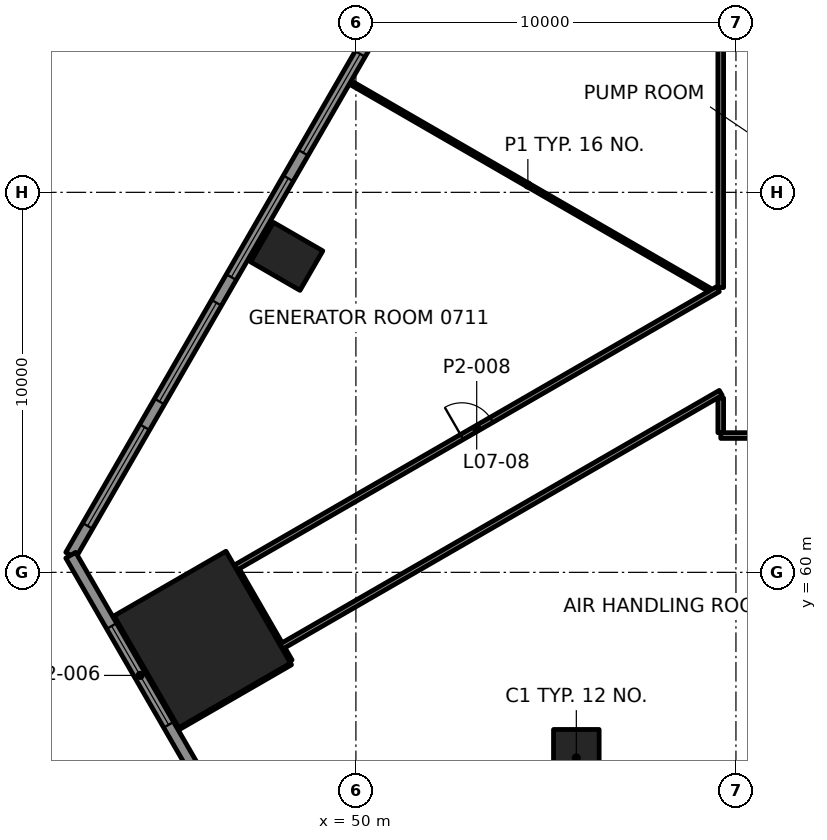
"""IFC4 building model, lengths in metres.
Left out: names, types, materials, properties, quantities, classifications, styles, units other than length and angle.
Written with IfcOpenShell. Run it as: python <this file> out.ifc"""

import sys

from ifc_helpers import new_model, si_unit, direction, frame, frame_2d, origin, origin_2d, place, context, subcontext, project, spatial, rectangle, extrude, element, fill, save


model = new_model("IFC4")
c1 = context("Model", 3, precision=1e-05, world=origin(), true_north=direction((0.0, 1.0)))
c2 = subcontext(c1, "Body", "Model", "MODEL_VIEW")
j1 = project(units=[si_unit("LENGTHUNIT", "METRE"), si_unit("PLANEANGLEUNIT", "RADIAN")], contexts=[c1])
p1 = place(None, origin())
s1 = spatial("IfcSite", under=j1, at=p1, CompositionType="ELEMENT")
p2 = place(p1, origin())
s2 = spatial("IfcBuilding", under=s1, at=p2, CompositionType="ELEMENT")
p3 = place(p2, frame((0.0, 0.0, 35.5)))
s3 = spatial("IfcBuildingStorey", under=s2, at=p3, CompositionType="ELEMENT", Elevation=35.5)
p4 = place(p3, frame((45.959, 58.233, 0.0), z_axis=(0.0, 0.0, 1.0), x_axis=(0.5, -0.866025403784, 0.0)))
e1 = element("IfcColumn", 1, at=p4, inside=s3, PredefinedType="COLUMN", context=c2, shape_type="SweptSolid", body=[
    extrude(rectangle(XDim=3.4, YDim=3.4, at=origin_2d()), origin(), (0.0, 0.0, 1.0), 4.5),
])
for number, where, z_axis, x_axis in (
    (2, (55.8, 55.115, -0.0), (0.0, 0.0, 1.0), (1.0, 0.0, 0.0)),
    (3, (48.179, 68.315, -0.0), (0.0, 0.0, 1.0), (-0.5, -0.866, 0.0)),
):
    element("IfcColumn", number, at=place(p3, frame(where, z_axis=z_axis, x_axis=x_axis)), inside=s3, PredefinedType="COLUMN", context=c2, shape_type="SweptSolid", body=[
        extrude(rectangle(XDim=1.2, YDim=1.5, at=origin_2d()), origin(), (0.0, 0.0, 1.0), 4.5),
    ])
p5 = place(p3, frame((90.4, 63.6, 0.0), z_axis=(0.0, 0.0, 1.0), x_axis=(-1.0, 0.0, 0.0)))
e4 = element("IfcWall", 4, at=p5, inside=s3, PredefinedType="PARTITIONING", context=c2, shape_type="SweptSolid", body=[
    extrude(rectangle(XDim=30.799, YDim=0.15, at=frame_2d((15.4, 0.0))), origin(), (0.0, 0.0, 1.0), 3.7),
])
p6 = place(p5, frame((3.751, 0.0, 0.0)))
e5 = element("IfcOpeningElement", 5, at=p6, cuts=e4, PredefinedType="OPENING", context=c2, shape_type="SweptSolid", body=[
    extrude(rectangle(XDim=0.9, YDim=2.1, at=frame_2d((0.45, 1.05))), frame((0.0, 0.085, 0.0), z_axis=(0.0, -1.0, 0.0), x_axis=(1.0, 0.0, 0.0)), (0.0, 0.0, 1.0), 0.17),
])
p7 = place(p5, frame((14.8, 0.0, 0.0)))
e6 = element("IfcOpeningElement", 6, at=p7, cuts=e4, PredefinedType="OPENING", context=c2, shape_type="SweptSolid", body=[
    extrude(rectangle(XDim=1.2, YDim=2.1, at=frame_2d((0.6, 1.05))), frame((0.0, 0.085, 0.0), z_axis=(0.0, -1.0, 0.0), x_axis=(1.0, 0.0, 0.0)), (0.0, 0.0, 1.0), 0.17),
])
p8 = place(p5, frame((25.998, 0.0, 0.0)))
e7 = element("IfcOpeningElement", 7, at=p8, cuts=e4, PredefinedType="OPENING", context=c2, shape_type="SweptSolid", body=[
    extrude(rectangle(XDim=1.2, YDim=2.1, at=frame_2d((0.6, 1.05))), frame((0.0, 0.085, 0.0), z_axis=(0.0, -1.0, 0.0), x_axis=(1.0, 0.0, 0.0)), (0.0, 0.0, 1.0), 0.17),
])
p9 = place(p3, frame((45.198, 55.831, 0.0), z_axis=(0.0, 0.0, 1.0), x_axis=(0.866014251095, 0.500019316528, 0.0)))
e8 = element("IfcWall", 8, at=p9, inside=s3, PredefinedType="PARTITIONING", context=c2, shape_type="SweptSolid", body=[
    extrude(rectangle(XDim=3.559, YDim=0.1, at=frame_2d((1.78, 0.0))), origin(), (0.0, 0.0, 1.0), 3.7),
])
p10 = place(p3, frame((48.031, 58.044, 0.0), z_axis=(0.0, 0.0, 1.0), x_axis=(0.866027935033, 0.499995615723, 0.0)))
e9 = element("IfcWall", 9, at=p10, inside=s3, PredefinedType="PARTITIONING", context=c2, shape_type="SweptSolid", body=[
    extrude(rectangle(XDim=13.358, YDim=0.15, at=frame_2d((6.679, 0.0))), origin(), (0.0, 0.0, 1.0), 3.547),
])
p11 = place(p3, frame((46.832, 60.123, 0.0), z_axis=(0.0, 0.0, 1.0), x_axis=(0.866022484069, 0.500005057062, 0.0)))
e10 = element("IfcWall", 10, at=p11, inside=s3, PredefinedType="PARTITIONING", context=c2, shape_type="SweptSolid", body=[
    extrude(rectangle(XDim=14.657, YDim=0.15, at=frame_2d((7.329, 0.0))), origin(), (0.0, 0.0, 1.0), 3.7),
])
p12 = place(p11, frame((6.879, 0.0, 0.0)))
e11 = element("IfcOpeningElement", 11, at=p12, cuts=e10, PredefinedType="OPENING", context=c2, shape_type="SweptSolid", body=[
    extrude(rectangle(XDim=0.9, YDim=2.1, at=frame_2d((0.45, 1.05))), frame((0.0, 0.085, 0.0), z_axis=(0.0, -1.0, 0.0), x_axis=(1.0, 0.0, 0.0)), (0.0, 0.0, 1.0), 0.17),
])
p13 = place(p3, frame((59.6, 63.676, 0.0), z_axis=(0.0, 0.0, 1.0), x_axis=(0.0, 1.0, 0.0)))
e12 = element("IfcWall", 12, at=p13, inside=s3, PredefinedType="PARTITIONING", context=c2, shape_type="SweptSolid", body=[
    extrude(rectangle(XDim=0.911, YDim=0.15, at=frame_2d((0.456, 0.0))), origin(), (0.0, 0.0, 1.0), 3.7),
])
p14 = place(p3, frame((59.6, 67.494, 0.0), z_axis=(0.0, 0.0, 1.0), x_axis=(0.0, 1.0, 0.0)))
e13 = element("IfcWall", 13, at=p14, inside=s3, PredefinedType="PARTITIONING", context=c2, shape_type="SweptSolid", body=[
    extrude(rectangle(XDim=18.905, YDim=0.15, at=frame_2d((9.453, 0.0))), origin(), (0.0, 0.0, 1.0), 3.7),
])
p15 = place(p3, frame((48.256, 57.655, 0.0), z_axis=(0.0, 0.0, 1.0), x_axis=(-0.499854089722, 0.866109628736, 0.0)))
e14 = element("IfcWall", 14, at=p15, inside=s3, PredefinedType="PARTITIONING", context=c2, shape_type="SweptSolid", body=[
    extrude(rectangle(XDim=0.375, YDim=0.15, at=frame_2d((0.187, 0.0))), origin(), (0.0, 0.0, 1.0), 3.7),
])
p16 = place(p3, frame((59.299, 67.437, 0.0), z_axis=(0.0, 0.0, 1.0), x_axis=(-0.866020403282, 0.500008661025, 0.0)))
e15 = element("IfcWall", 15, at=p16, inside=s3, PredefinedType="PARTITIONING", context=c2, shape_type="SweptSolid", body=[
    extrude(rectangle(XDim=11.027, YDim=0.1, at=frame_2d((5.513, 0.0))), origin(), (0.0, 0.0, 1.0), 3.465),
])
p17 = place(p3, frame((47.993, 58.109, 0.0), z_axis=(0.0, 0.0, 1.0), x_axis=(-0.499944821793, 0.866057258594, 0.0)))
e16 = element("IfcWall", 16, at=p17, inside=s3, PredefinedType="PARTITIONING", context=c2, shape_type="SweptSolid", body=[
    extrude(rectangle(XDim=2.249, YDim=0.15, at=frame_2d((1.125, 0.0))), origin(), (0.0, 0.0, 1.0), 3.547),
])
p18 = place(p3, frame((71.348, 110.424, 0.0), z_axis=(0.0, 0.0, 1.0), x_axis=(-0.500000550228, -0.86602508611, 0.0)))
e17 = element("IfcWall", 17, at=p18, inside=s3, PredefinedType="SOLIDWALL", context=c2, shape_type="SweptSolid", body=[
    extrude(rectangle(XDim=57.704, YDim=0.3, at=frame_2d((28.852, 0.0))), origin(), (0.0, 0.0, 1.0), 4.3),
])
p19 = place(p18, frame((0.89, 0.0, 0.8)))
e18 = element("IfcOpeningElement", 18, at=p19, cuts=e17, PredefinedType="OPENING", context=c2, shape_type="SweptSolid", body=[
    extrude(rectangle(XDim=3.0, YDim=2.4, at=frame_2d((1.5, 1.2))), frame((0.0, 0.16, 0.0), z_axis=(0.0, -1.0, 0.0), x_axis=(1.0, 0.0, 0.0)), (0.0, 0.0, 1.0), 0.32),
])
p20 = place(p18, frame((4.67, 0.0, 0.8)))
e19 = element("IfcOpeningElement", 19, at=p20, cuts=e17, PredefinedType="OPENING", context=c2, shape_type="SweptSolid", body=[
    extrude(rectangle(XDim=3.0, YDim=2.4, at=frame_2d((1.5, 1.2))), frame((0.0, 0.16, 0.0), z_axis=(0.0, -1.0, 0.0), x_axis=(1.0, 0.0, 0.0)), (0.0, 0.0, 1.0), 0.32),
])
p21 = place(p18, frame((8.451, 0.0, 0.8)))
e20 = element("IfcOpeningElement", 20, at=p21, cuts=e17, PredefinedType="OPENING", context=c2, shape_type="SweptSolid", body=[
    extrude(rectangle(XDim=3.0, YDim=2.4, at=frame_2d((1.5, 1.2))), frame((0.0, 0.16, 0.0), z_axis=(0.0, -1.0, 0.0), x_axis=(1.0, 0.0, 0.0)), (0.0, 0.0, 1.0), 0.32),
])
p22 = place(p18, frame((12.231, 0.0, 0.8)))
e21 = element("IfcOpeningElement", 21, at=p22, cuts=e17, PredefinedType="OPENING", context=c2, shape_type="SweptSolid", body=[
    extrude(rectangle(XDim=3.0, YDim=2.4, at=frame_2d((1.5, 1.2))), frame((0.0, 0.16, 0.0), z_axis=(0.0, -1.0, 0.0), x_axis=(1.0, 0.0, 0.0)), (0.0, 0.0, 1.0), 0.32),
])
p23 = place(p18, frame((16.011, 0.0, 0.8)))
e22 = element("IfcOpeningElement", 22, at=p23, cuts=e17, PredefinedType="OPENING", context=c2, shape_type="SweptSolid", body=[
    extrude(rectangle(XDim=3.0, YDim=2.4, at=frame_2d((1.5, 1.2))), frame((0.0, 0.16, 0.0), z_axis=(0.0, -1.0, 0.0), x_axis=(1.0, 0.0, 0.0)), (0.0, 0.0, 1.0), 0.32),
])
p24 = place(p18, frame((19.792, 0.0, 0.8)))
e23 = element("IfcOpeningElement", 23, at=p24, cuts=e17, PredefinedType="OPENING", context=c2, shape_type="SweptSolid", body=[
    extrude(rectangle(XDim=3.0, YDim=2.4, at=frame_2d((1.5, 1.2))), frame((0.0, 0.16, 0.0), z_axis=(0.0, -1.0, 0.0), x_axis=(1.0, 0.0, 0.0)), (0.0, 0.0, 1.0), 0.32),
])
p25 = place(p18, frame((23.572, 0.0, 0.8)))
e24 = element("IfcOpeningElement", 24, at=p25, cuts=e17, PredefinedType="OPENING", context=c2, shape_type="SweptSolid", body=[
    extrude(rectangle(XDim=3.0, YDim=2.4, at=frame_2d((1.5, 1.2))), frame((0.0, 0.16, 0.0), z_axis=(0.0, -1.0, 0.0), x_axis=(1.0, 0.0, 0.0)), (0.0, 0.0, 1.0), 0.32),
])
p26 = place(p18, frame((27.352, 0.0, 0.8)))
e25 = element("IfcOpeningElement", 25, at=p26, cuts=e17, PredefinedType="OPENING", context=c2, shape_type="SweptSolid", body=[
    extrude(rectangle(XDim=3.0, YDim=2.4, at=frame_2d((1.5, 1.2))), frame((0.0, 0.16, 0.0), z_axis=(0.0, -1.0, 0.0), x_axis=(1.0, 0.0, 0.0)), (0.0, 0.0, 1.0), 0.32),
])
p27 = place(p18, frame((31.132, 0.0, 0.8)))
e26 = element("IfcOpeningElement", 26, at=p27, cuts=e17, PredefinedType="OPENING", context=c2, shape_type="SweptSolid", body=[
    extrude(rectangle(XDim=3.0, YDim=2.4, at=frame_2d((1.5, 1.2))), frame((0.0, 0.16, 0.0), z_axis=(0.0, -1.0, 0.0), x_axis=(1.0, 0.0, 0.0)), (0.0, 0.0, 1.0), 0.32),
])
p28 = place(p18, frame((34.913, 0.0, 0.8)))
e27 = element("IfcOpeningElement", 27, at=p28, cuts=e17, PredefinedType="OPENING", context=c2, shape_type="SweptSolid", body=[
    extrude(rectangle(XDim=3.0, YDim=2.4, at=frame_2d((1.5, 1.2))), frame((0.0, 0.16, 0.0), z_axis=(0.0, -1.0, 0.0), x_axis=(1.0, 0.0, 0.0)), (0.0, 0.0, 1.0), 0.32),
])
p29 = place(p18, frame((38.693, 0.0, 0.8)))
e28 = element("IfcOpeningElement", 28, at=p29, cuts=e17, PredefinedType="OPENING", context=c2, shape_type="SweptSolid", body=[
    extrude(rectangle(XDim=3.0, YDim=2.4, at=frame_2d((1.5, 1.2))), frame((0.0, 0.16, 0.0), z_axis=(0.0, -1.0, 0.0), x_axis=(1.0, 0.0, 0.0)), (0.0, 0.0, 1.0), 0.32),
])
p30 = place(p18, frame((42.473, 0.0, 0.8)))
e29 = element("IfcOpeningElement", 29, at=p30, cuts=e17, PredefinedType="OPENING", context=c2, shape_type="SweptSolid", body=[
    extrude(rectangle(XDim=3.0, YDim=2.4, at=frame_2d((1.5, 1.2))), frame((0.0, 0.16, 0.0), z_axis=(0.0, -1.0, 0.0), x_axis=(1.0, 0.0, 0.0)), (0.0, 0.0, 1.0), 0.32),
])
p31 = place(p18, frame((46.253, 0.0, 0.8)))
e30 = element("IfcOpeningElement", 30, at=p31, cuts=e17, PredefinedType="OPENING", context=c2, shape_type="SweptSolid", body=[
    extrude(rectangle(XDim=3.0, YDim=2.4, at=frame_2d((1.5, 1.2))), frame((0.0, 0.16, 0.0), z_axis=(0.0, -1.0, 0.0), x_axis=(1.0, 0.0, 0.0)), (0.0, 0.0, 1.0), 0.32),
])
p32 = place(p18, frame((50.033, 0.0, 0.8)))
e31 = element("IfcOpeningElement", 31, at=p32, cuts=e17, PredefinedType="OPENING", context=c2, shape_type="SweptSolid", body=[
    extrude(rectangle(XDim=3.0, YDim=2.4, at=frame_2d((1.5, 1.2))), frame((0.0, 0.16, 0.0), z_axis=(0.0, -1.0, 0.0), x_axis=(1.0, 0.0, 0.0)), (0.0, 0.0, 1.0), 0.32),
])
p33 = place(p18, frame((53.814, 0.0, 0.8)))
e32 = element("IfcOpeningElement", 32, at=p33, cuts=e17, PredefinedType="OPENING", context=c2, shape_type="SweptSolid", body=[
    extrude(rectangle(XDim=3.0, YDim=2.4, at=frame_2d((1.5, 1.2))), frame((0.0, 0.16, 0.0), z_axis=(0.0, -1.0, 0.0), x_axis=(1.0, 0.0, 0.0)), (0.0, 0.0, 1.0), 0.32),
])
p34 = place(p3, frame((42.496, 60.451, 0.0), z_axis=(0.0, 0.0, 1.0), x_axis=(0.500000231294, -0.866025270247, 0.0)))
e33 = element("IfcWall", 33, at=p34, inside=s3, PredefinedType="SOLIDWALL", context=c2, shape_type="SweptSolid", body=[
    extrude(rectangle(XDim=7.304, YDim=0.3, at=frame_2d((3.652, 0.0))), origin(), (0.0, 0.0, 1.0), 4.3),
])
p35 = place(p34, frame((2.152, 0.0, 0.8)))
e34 = element("IfcOpeningElement", 34, at=p35, cuts=e33, PredefinedType="OPENING", context=c2, shape_type="SweptSolid", body=[
    extrude(rectangle(XDim=3.0, YDim=2.4, at=frame_2d((1.5, 1.2))), frame((0.0, 0.16, 0.0), z_axis=(0.0, -1.0, 0.0), x_axis=(1.0, 0.0, 0.0)), (0.0, 0.0, 1.0), 0.32),
])
p36 = place(p12, origin())
e35 = element("IfcDoor", 35, at=p36, inside=s3, OperationType="SINGLE_SWING_RIGHT", PredefinedType="DOOR", context=c2, shape_type="SweptSolid", body=[
    extrude(rectangle(XDim=0.9, YDim=2.1, at=frame_2d((0.45, 1.05))), frame((0.0, 0.025, 0.0), z_axis=(0.0, -1.0, 0.0), x_axis=(1.0, 0.0, 0.0)), (0.0, 0.0, 1.0), 0.05),
])
fill(e11, e35)
p37 = place(p30, origin())
e36 = element("IfcWindow", 36, at=p37, inside=s3, PartitioningType="SINGLE_PANEL", PredefinedType="WINDOW", context=c2, shape_type="SweptSolid", body=[
    extrude(rectangle(XDim=3.0, YDim=2.4, at=frame_2d((1.5, 1.2))), frame((0.0, 0.03, 0.0), z_axis=(0.0, -1.0, 0.0), x_axis=(1.0, 0.0, 0.0)), (0.0, 0.0, 1.0), 0.06),
])
fill(e29, e36)
p38 = place(p31, origin())
e37 = element("IfcWindow", 37, at=p38, inside=s3, PartitioningType="SINGLE_PANEL", PredefinedType="WINDOW", context=c2, shape_type="SweptSolid", body=[
    extrude(rectangle(XDim=3.0, YDim=2.4, at=frame_2d((1.5, 1.2))), frame((0.0, 0.03, 0.0), z_axis=(0.0, -1.0, 0.0), x_axis=(1.0, 0.0, 0.0)), (0.0, 0.0, 1.0), 0.06),
])
fill(e30, e37)
p39 = place(p32, origin())
e38 = element("IfcWindow", 38, at=p39, inside=s3, PartitioningType="SINGLE_PANEL", PredefinedType="WINDOW", context=c2, shape_type="SweptSolid", body=[
    extrude(rectangle(XDim=3.0, YDim=2.4, at=frame_2d((1.5, 1.2))), frame((0.0, 0.03, 0.0), z_axis=(0.0, -1.0, 0.0), x_axis=(1.0, 0.0, 0.0)), (0.0, 0.0, 1.0), 0.06),
])
fill(e31, e38)
p40 = place(p33, origin())
e39 = element("IfcWindow", 39, at=p40, inside=s3, PartitioningType="SINGLE_PANEL", PredefinedType="WINDOW", context=c2, shape_type="SweptSolid", body=[
    extrude(rectangle(XDim=3.0, YDim=2.4, at=frame_2d((1.5, 1.2))), frame((0.0, 0.03, 0.0), z_axis=(0.0, -1.0, 0.0), x_axis=(1.0, 0.0, 0.0)), (0.0, 0.0, 1.0), 0.06),
])
fill(e32, e39)
p41 = place(p35, origin())
e40 = element("IfcWindow", 40, at=p41, inside=s3, PartitioningType="SINGLE_PANEL", PredefinedType="WINDOW", context=c2, shape_type="SweptSolid", body=[
    extrude(rectangle(XDim=3.0, YDim=2.4, at=frame_2d((1.5, 1.2))), frame((0.0, 0.03, 0.0), z_axis=(0.0, -1.0, 0.0), x_axis=(1.0, 0.0, 0.0)), (0.0, 0.0, 1.0), 0.06),
])
fill(e34, e40)
save(model, sys.argv[1])
